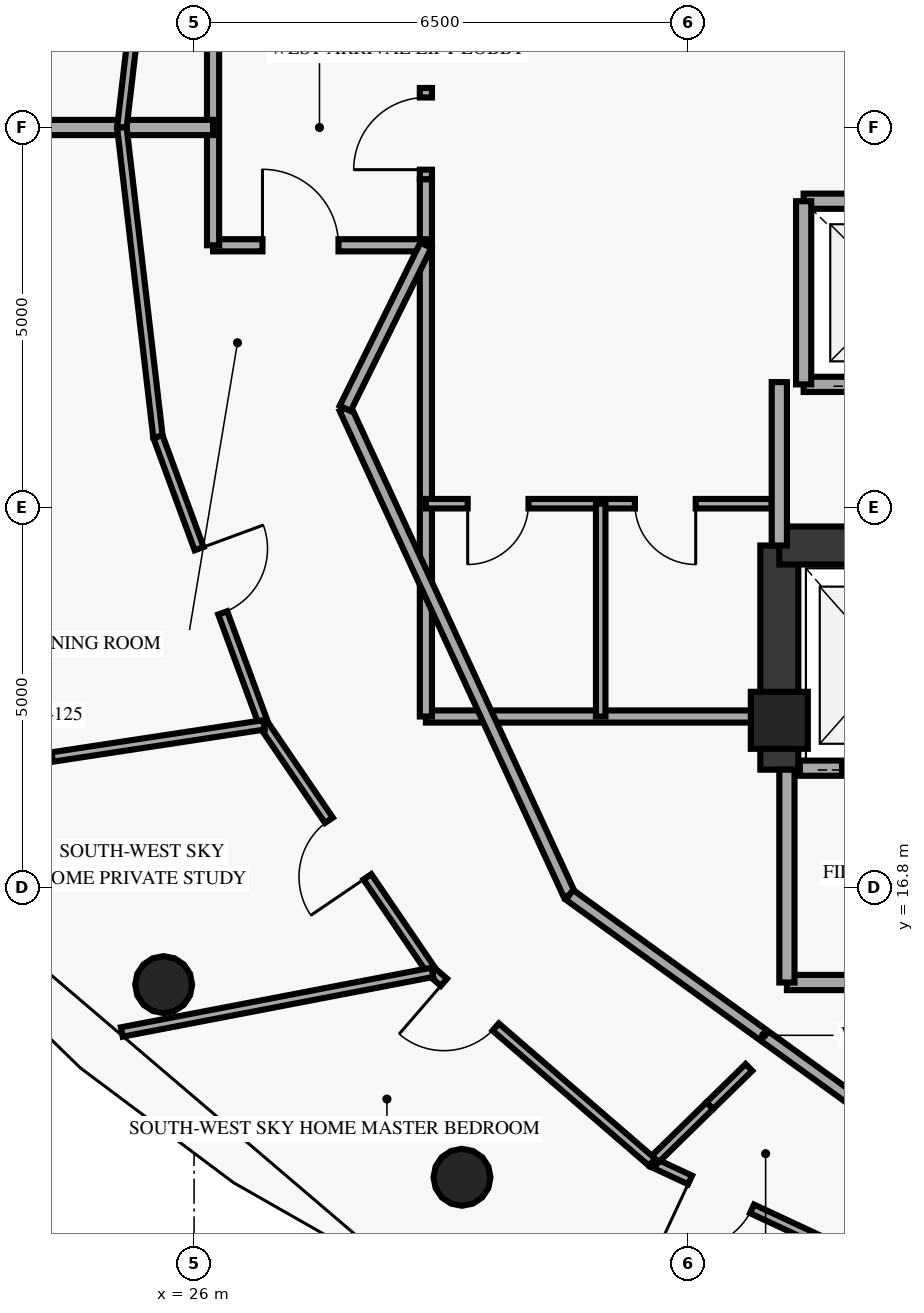
"""IFC4 building model, lengths in metres.
Left out: names, types, materials, properties, quantities, classifications, styles, units other than length and angle.
Written with IfcOpenShell. Run it as: python <this file> out.ifc"""

import sys

from ifc_helpers import new_model, si_unit, direction, frame, frame_2d, origin, origin_2d, place, context, subcontext, project, spatial, rectangle, circle, extrude, element, fill, save


model = new_model("IFC4")
c1 = context("Model", 3, precision=1e-05, world=origin(), true_north=direction((0.0, 1.0)))
c2 = subcontext(c1, "Body", "Model", "MODEL_VIEW")
j1 = project(units=[si_unit("LENGTHUNIT", "METRE"), si_unit("PLANEANGLEUNIT", "RADIAN")], contexts=[c1])
p1 = place(None, origin())
s1 = spatial("IfcSite", under=j1, at=p1, CompositionType="ELEMENT")
p2 = place(p1, origin())
s2 = spatial("IfcBuilding", under=s1, at=p2, CompositionType="ELEMENT")
p3 = place(p2, frame((0.0, 0.0, 297.4)))
s3 = spatial("IfcBuildingStorey", under=s2, at=p3, CompositionType="ELEMENT", Elevation=297.4)
p4 = place(p3, frame((33.7, 19.0, 0.0), z_axis=(0.0, 0.0, 1.0), x_axis=(1.0, 0.0, 0.0)))
e1 = element("IfcColumn", 1, at=p4, inside=s3, PredefinedType="PILASTER", context=c2, shape_type="SweptSolid", body=[
    extrude(rectangle(XDim=0.75, YDim=0.75, at=origin_2d()), origin(), (0.0, 0.0, 1.0), 3.45),
])
for number, where, z_axis, x_axis in (
    (2, (25.6, 15.522, 0.0), (0.0, 0.0, 1.0), (1.0, 0.0, 0.0)),
    (3, (29.525, 12.987, 0.0), (0.0, 0.0, 1.0), (1.0, 0.0, 0.0)),
):
    element("IfcColumn", number, at=place(p3, frame(where, z_axis=z_axis, x_axis=x_axis)), inside=s3, PredefinedType="COLUMN", context=c2, shape_type="SweptSolid", body=[
        extrude(circle(Radius=0.375, at=origin_2d()), origin(), (0.0, 0.0, 1.0), 3.45),
    ])
p5 = place(p3, frame((33.7, 18.35, 0.0), z_axis=(0.0, 0.0, 1.0), x_axis=(0.0, 1.0, 0.0)))
e4 = element("IfcWall", 4, at=p5, inside=s3, PredefinedType="SHEAR", context=c2, shape_type="SweptSolid", body=[
    extrude(rectangle(XDim=2.95, YDim=0.5, at=frame_2d((1.475, 0.0))), origin(), (0.0, 0.0, 1.0), 3.45),
])
p6 = place(p3, frame((33.7, 21.3, 0.0), z_axis=(0.0, 0.0, 1.0), x_axis=(1.0, 0.0, 0.0)))
e5 = element("IfcWall", 5, at=p6, inside=s3, PredefinedType="SHEAR", context=c2, shape_type="SweptSolid", body=[
    extrude(rectangle(XDim=7.55, YDim=0.5, at=frame_2d((3.775, 0.0))), origin(), (0.0, 0.0, 1.0), 3.45),
])
p7 = place(p3, frame((34.02, 23.42, 0.0), z_axis=(0.0, 0.0, 1.0), x_axis=(1.0, 0.0, 0.0)))
e6 = element("IfcWall", 6, at=p7, inside=s3, PredefinedType="SOLIDWALL", context=c2, shape_type="SweptSolid", body=[
    extrude(rectangle(XDim=2.5, YDim=0.2, at=frame_2d((1.25, 0.0))), origin(), (0.0, 0.0, 1.0), 3.45),
])
p8 = place(p7, frame((0.7, 0.0, 0.0)))
e7 = element("IfcOpeningElement", 7, at=p8, cuts=e6, PredefinedType="OPENING", context=c2, shape_type="SweptSolid", body=[
    extrude(rectangle(XDim=1.1, YDim=2.15, at=frame_2d((0.55, 1.075))), frame((0.0, 0.11, 0.0), z_axis=(0.0, -1.0, 0.0), x_axis=(1.0, 0.0, 0.0)), (0.0, 0.0, 1.0), 0.22),
])
p9 = place(p3, frame((34.02, 25.83, 0.0), z_axis=(0.0, 0.0, 1.0), x_axis=(1.0, 0.0, 0.0)))
e8 = element("IfcWall", 8, at=p9, inside=s3, PredefinedType="SOLIDWALL", context=c2, shape_type="SweptSolid", body=[
    extrude(rectangle(XDim=2.5, YDim=0.2, at=frame_2d((1.25, 0.0))), origin(), (0.0, 0.0, 1.0), 3.45),
])
p10 = place(p3, frame((34.02, 23.42, 0.0), z_axis=(0.0, 0.0, 1.0), x_axis=(0.0, 1.0, 0.0)))
e9 = element("IfcWall", 9, at=p10, inside=s3, PredefinedType="SOLIDWALL", context=c2, shape_type="SweptSolid", body=[
    extrude(rectangle(XDim=2.41, YDim=0.2, at=frame_2d((1.205, 0.0))), origin(), (0.0, 0.0, 1.0), 3.45),
])
p11 = place(p3, frame((33.97, 18.37, 0.0), z_axis=(0.0, 0.0, 1.0), x_axis=(1.0, 0.0, 0.0)))
e10 = element("IfcWall", 10, at=p11, inside=s3, PredefinedType="SOLIDWALL", context=c2, shape_type="SweptSolid", body=[
    extrude(rectangle(XDim=2.36, YDim=0.2, at=frame_2d((1.18, 0.0))), origin(), (0.0, 0.0, 1.0), 3.45),
])
p12 = place(p11, frame((0.555, 0.0, 0.0)))
e11 = element("IfcOpeningElement", 11, at=p12, cuts=e10, PredefinedType="OPENING", context=c2, shape_type="SweptSolid", body=[
    extrude(rectangle(XDim=1.25, YDim=2.2, at=frame_2d((0.625, 1.1))), frame((0.0, 0.11, 0.0), z_axis=(0.0, -1.0, 0.0), x_axis=(1.0, 0.0, 0.0)), (0.0, 0.0, 1.0), 0.22),
])
p13 = place(p3, frame((29.05, 19.05, 0.0), z_axis=(0.0, 0.0, 1.0), x_axis=(1.0, 0.0, 0.0)))
e12 = element("IfcWall", 12, at=p13, inside=s3, PredefinedType="PARTITIONING", context=c2, shape_type="SweptSolid", body=[
    extrude(rectangle(XDim=4.65, YDim=0.16, at=frame_2d((2.325, 0.0))), origin(), (0.0, 0.0, 1.0), 3.45),
])
p14 = place(p3, frame((29.05, 19.05, 0.0), z_axis=(0.0, 0.0, 1.0), x_axis=(0.0, 1.0, 0.0)))
e13 = element("IfcWall", 13, at=p14, inside=s3, PredefinedType="PARTITIONING", context=c2, shape_type="SweptSolid", body=[
    extrude(rectangle(XDim=7.07, YDim=0.16, at=frame_2d((3.535, 0.0))), origin(), (0.0, 0.0, 1.0), 3.45),
])
p15 = place(p3, frame((33.6, 21.85, 0.0), z_axis=(0.0, 0.0, 1.0), x_axis=(-1.0, 0.0, 0.0)))
e14 = element("IfcWall", 14, at=p15, inside=s3, PredefinedType="PARTITIONING", context=c2, shape_type="SweptSolid", body=[
    extrude(rectangle(XDim=4.55, YDim=0.125, at=frame_2d((2.275, 0.0))), origin(), (0.0, 0.0, 1.0), 3.45),
])
p16 = place(p15, frame((3.2, 0.0, 0.0)))
e15 = element("IfcOpeningElement", 15, at=p16, cuts=e14, PredefinedType="OPENING", context=c2, shape_type="SweptSolid", body=[
    extrude(rectangle(XDim=0.8, YDim=2.05, at=frame_2d((0.4, 1.025))), frame((0.0, 0.073, 0.0), z_axis=(0.0, -1.0, 0.0), x_axis=(1.0, 0.0, 0.0)), (0.0, 0.0, 1.0), 0.145),
])
p17 = place(p15, frame((1.0, 0.0, 0.0)))
e16 = element("IfcOpeningElement", 16, at=p17, cuts=e14, PredefinedType="OPENING", context=c2, shape_type="SweptSolid", body=[
    extrude(rectangle(XDim=0.8, YDim=2.05, at=frame_2d((0.4, 1.025))), frame((0.0, 0.073, 0.0), z_axis=(0.0, -1.0, 0.0), x_axis=(1.0, 0.0, 0.0)), (0.0, 0.0, 1.0), 0.145),
])
p18 = place(p3, frame((31.35, 19.05, 0.0), z_axis=(0.0, 0.0, 1.0), x_axis=(0.0, 1.0, 0.0)))
e17 = element("IfcWall", 17, at=p18, inside=s3, PredefinedType="PARTITIONING", context=c2, shape_type="SweptSolid", body=[
    extrude(rectangle(XDim=2.8, YDim=0.125, at=frame_2d((1.4, 0.0))), origin(), (0.0, 0.0, 1.0), 3.45),
])
p19 = place(p3, frame((33.7, 21.3, 0.0), z_axis=(0.0, 0.0, 1.0), x_axis=(0.0, 1.0, 0.0)))
e18 = element("IfcWall", 18, at=p19, inside=s3, PredefinedType="SOLIDWALL", context=c2, shape_type="SweptSolid", body=[
    extrude(rectangle(XDim=2.15, YDim=0.2, at=frame_2d((1.075, 0.0))), origin(), (0.0, 0.0, 1.0), 2.835),
])
p20 = place(p3, frame((33.8, 15.55, 0.0), z_axis=(0.0, 0.0, 1.0), x_axis=(1.0, 0.0, 0.0)))
e19 = element("IfcWall", 19, at=p20, inside=s3, PredefinedType="SOLIDWALL", context=c2, shape_type="SweptSolid", body=[
    extrude(rectangle(XDim=7.55, YDim=0.2, at=frame_2d((3.775, 0.0))), origin(), (0.0, 0.0, 1.0), 3.45),
])
p21 = place(p3, frame((33.8, 15.55, 0.0), z_axis=(0.0, 0.0, 1.0), x_axis=(0.0, 1.0, 0.0)))
e20 = element("IfcWall", 20, at=p21, inside=s3, PredefinedType="SOLIDWALL", context=c2, shape_type="SweptSolid", body=[
    extrude(rectangle(XDim=2.8, YDim=0.2, at=frame_2d((1.4, 0.0))), origin(), (0.0, 0.0, 1.0), 3.45),
])
p22 = place(p3, frame((29.05, 26.12, 0.0), z_axis=(0.0, 0.0, 1.0), x_axis=(0.0, 1.0, 0.0)))
e21 = element("IfcWall", 21, at=p22, inside=s3, PredefinedType="PARTITIONING", context=c2, shape_type="SweptSolid", body=[
    extrude(rectangle(XDim=1.2, YDim=0.16, at=frame_2d((0.6, 0.0))), origin(), (0.0, 0.0, 1.0), 3.45),
])
p23 = place(p22, frame((0.125, 0.0, 0.0)))
e22 = element("IfcOpeningElement", 22, at=p23, cuts=e21, PredefinedType="OPENING", context=c2, shape_type="SweptSolid", body=[
    extrude(rectangle(XDim=0.95, YDim=2.15, at=frame_2d((0.475, 1.075))), frame((0.0, 0.09, 0.0), z_axis=(0.0, -1.0, 0.0), x_axis=(1.0, 0.0, 0.0)), (0.0, 0.0, 1.0), 0.18),
])
p24 = place(p3, frame((27.988, 23.104, 0.0), z_axis=(0.0, 0.0, 1.0), x_axis=(0.418656179426, -0.908144814128, 0.0)))
e23 = element("IfcWall", 23, at=p24, inside=s3, PredefinedType="PARTITIONING", context=c2, shape_type="SweptSolid", body=[
    extrude(rectangle(XDim=7.049, YDim=0.16, at=frame_2d((3.524, 0.0))), origin(), (0.0, 0.0, 1.0), 3.45),
])
p25 = place(p3, frame((30.939, 16.703, 0.0), z_axis=(0.0, 0.0, 1.0), x_axis=(0.810290119061, -0.586028943784, 0.0)))
e24 = element("IfcWall", 24, at=p25, inside=s3, PredefinedType="PARTITIONING", context=c2, shape_type="SweptSolid", body=[
    extrude(rectangle(XDim=6.306, YDim=0.16, at=frame_2d((3.153, 0.0))), origin(), (0.0, 0.0, 1.0), 3.45),
])
p26 = place(p3, frame((26.25, 25.25, 0.0), z_axis=(0.0, 0.0, 1.0), x_axis=(1.0, 0.0, 0.0)))
e25 = element("IfcWall", 25, at=p26, inside=s3, PredefinedType="PARTITIONING", context=c2, shape_type="SweptSolid", body=[
    extrude(rectangle(XDim=2.8, YDim=0.16, at=frame_2d((1.4, 0.0))), origin(), (0.0, 0.0, 1.0), 3.45),
])
p27 = place(p26, frame((0.65, 0.0, 0.0)))
e26 = element("IfcOpeningElement", 26, at=p27, cuts=e25, PredefinedType="OPENING", context=c2, shape_type="SweptSolid", body=[
    extrude(rectangle(XDim=1.0, YDim=2.15, at=frame_2d((0.5, 1.075))), frame((0.0, 0.09, 0.0), z_axis=(0.0, -1.0, 0.0), x_axis=(1.0, 0.0, 0.0)), (0.0, 0.0, 1.0), 0.18),
])
p28 = place(p3, frame((26.25, 25.25, 0.0), z_axis=(0.0, 0.0, 1.0), x_axis=(0.0, 1.0, 0.0)))
e27 = element("IfcWall", 27, at=p28, inside=s3, PredefinedType="PARTITIONING", context=c2, shape_type="SweptSolid", body=[
    extrude(rectangle(XDim=3.1, YDim=0.16, at=frame_2d((1.55, 0.0))), origin(), (0.0, 0.0, 1.0), 3.45),
])
p29 = place(p3, frame((27.988, 23.104, 0.0), z_axis=(0.0, 0.0, 1.0), x_axis=(0.443539160525, 0.896254993337, 0.0)))
e28 = element("IfcWall", 28, at=p29, inside=s3, PredefinedType="PARTITIONING", context=c2, shape_type="SweptSolid", body=[
    extrude(rectangle(XDim=2.394, YDim=0.16, at=frame_2d((1.197, 0.0))), origin(), (0.0, 0.0, 1.0), 3.45),
])
p30 = place(p3, frame((26.25, 26.8, 0.0), z_axis=(0.0, 0.0, 1.0), x_axis=(-1.0, 0.0, 0.0)))
e29 = element("IfcWall", 29, at=p30, inside=s3, PredefinedType="PARTITIONING", context=c2, shape_type="SweptSolid", body=[
    extrude(rectangle(XDim=1.2, YDim=0.2, at=frame_2d((0.6, 0.0))), origin(), (0.0, 0.0, 1.0), 3.45),
])
p31 = place(p3, frame((25.05, 26.8, 0.0), z_axis=(0.0, 0.0, 1.0), x_axis=(-1.0, 0.0, 0.0)))
e30 = element("IfcWall", 30, at=p31, inside=s3, PredefinedType="PARTITIONING", context=c2, shape_type="SweptSolid", body=[
    extrude(rectangle(XDim=3.102, YDim=0.2, at=frame_2d((1.551, 0.0))), origin(), (0.0, 0.0, 1.0), 3.45),
])
p32 = place(p3, frame((25.525, 30.869, 0.0), z_axis=(0.0, 0.0, 1.0), x_axis=(-0.115917937966, -0.993258793899, 0.0)))
e31 = element("IfcWall", 31, at=p32, inside=s3, PredefinedType="PARTITIONING", context=c2, shape_type="SweptSolid", body=[
    extrude(rectangle(XDim=4.096, YDim=0.125, at=frame_2d((2.048, 0.0))), origin(), (0.0, 0.0, 1.0), 3.45),
])
p33 = place(p3, frame((35.389, 11.616, 0.0), z_axis=(0.0, 0.0, 1.0), x_axis=(-0.906162977721, 0.422928667517, 0.0)))
e32 = element("IfcWall", 32, at=p33, inside=s3, PredefinedType="PARTITIONING", context=c2, shape_type="SweptSolid", body=[
    extrude(rectangle(XDim=3.712, YDim=0.125, at=frame_2d((1.856, 0.0))), origin(), (0.0, 0.0, 1.0), 3.45),
])
p34 = place(p33, frame((2.26, 0.0, 0.0)))
e33 = element("IfcOpeningElement", 33, at=p34, cuts=e32, PredefinedType="OPENING", context=c2, shape_type="SweptSolid", body=[
    extrude(rectangle(XDim=0.9, YDim=2.1, at=frame_2d((0.45, 1.05))), frame((0.0, 0.073, 0.0), z_axis=(0.0, -1.0, 0.0), x_axis=(1.0, 0.0, 0.0)), (0.0, 0.0, 1.0), 0.145),
])
p35 = place(p3, frame((33.3, 14.433, 0.0), z_axis=(0.0, 0.0, 1.0), x_axis=(-0.714672361604, -0.699459373774, 0.0)))
e34 = element("IfcWall", 34, at=p35, inside=s3, PredefinedType="PARTITIONING", context=c2, shape_type="SweptSolid", body=[
    extrude(rectangle(XDim=0.722, YDim=0.125, at=frame_2d((0.361, 0.0))), origin(), (0.0, 0.0, 1.0), 3.095),
])
p36 = place(p3, frame((32.784, 13.928, 0.0), z_axis=(0.0, 0.0, 1.0), x_axis=(-0.715111418379, -0.699010485833, 0.0)))
e35 = element("IfcWall", 35, at=p36, inside=s3, PredefinedType="PARTITIONING", context=c2, shape_type="SweptSolid", body=[
    extrude(rectangle(XDim=1.062, YDim=0.125, at=frame_2d((0.531, 0.0))), origin(), (0.0, 0.0, 1.0), 3.45),
])
p37 = place(p3, frame((25.05, 26.8, 0.0), z_axis=(0.0, 0.0, 1.0), x_axis=(0.115911076473, -0.993259594643, 0.0)))
e36 = element("IfcWall", 36, at=p37, inside=s3, PredefinedType="PARTITIONING", context=c2, shape_type="SweptSolid", body=[
    extrude(rectangle(XDim=4.097, YDim=0.125, at=frame_2d((2.048, 0.0))), origin(), (0.0, 0.0, 1.0), 3.45),
])
p38 = place(p3, frame((26.919, 18.94, 0.0), z_axis=(0.0, 0.0, 1.0), x_axis=(-0.345128286029, 0.938555521097, 0.0)))
e37 = element("IfcWall", 37, at=p38, inside=s3, PredefinedType="PARTITIONING", context=c2, shape_type="SweptSolid", body=[
    extrude(rectangle(XDim=4.039, YDim=0.125, at=frame_2d((2.02, 0.0))), origin(), (0.0, 0.0, 1.0), 3.45),
])
p39 = place(p38, frame((1.57, 0.0, 0.0)))
e38 = element("IfcOpeningElement", 38, at=p39, cuts=e37, PredefinedType="OPENING", context=c2, shape_type="SweptSolid", body=[
    extrude(rectangle(XDim=0.9, YDim=2.1, at=frame_2d((0.45, 1.05))), frame((0.0, 0.073, 0.0), z_axis=(0.0, -1.0, 0.0), x_axis=(1.0, 0.0, 0.0)), (0.0, 0.0, 1.0), 0.145),
])
p40 = place(p3, frame((29.136, 15.684, 0.0), z_axis=(0.0, 0.0, 1.0), x_axis=(-0.562840533245, 0.826565505049, 0.0)))
e39 = element("IfcWall", 39, at=p40, inside=s3, PredefinedType="PARTITIONING", context=c2, shape_type="SweptSolid", body=[
    extrude(rectangle(XDim=3.939, YDim=0.125, at=frame_2d((1.969, 0.0))), origin(), (0.0, 0.0, 1.0), 3.45),
])
p41 = place(p40, frame((1.52, 0.0, 0.0)))
e40 = element("IfcOpeningElement", 40, at=p41, cuts=e39, PredefinedType="OPENING", context=c2, shape_type="SweptSolid", body=[
    extrude(rectangle(XDim=0.9, YDim=2.1, at=frame_2d((0.45, 1.05))), frame((0.0, 0.073, 0.0), z_axis=(0.0, -1.0, 0.0), x_axis=(1.0, 0.0, 0.0)), (0.0, 0.0, 1.0), 0.145),
])
p42 = place(p3, frame((32.025, 13.186, 0.0), z_axis=(0.0, 0.0, 1.0), x_axis=(-0.756424716633, 0.654080765706, 0.0)))
e41 = element("IfcWall", 41, at=p42, inside=s3, PredefinedType="PARTITIONING", context=c2, shape_type="SweptSolid", body=[
    extrude(rectangle(XDim=3.819, YDim=0.125, at=frame_2d((1.91, 0.0))), origin(), (0.0, 0.0, 1.0), 3.45),
])
p43 = place(p42, frame((2.719, 0.0, 0.0)))
e42 = element("IfcOpeningElement", 42, at=p43, cuts=e41, PredefinedType="OPENING", context=c2, shape_type="SweptSolid", body=[
    extrude(rectangle(XDim=0.9, YDim=2.1, at=frame_2d((0.45, 1.05))), frame((0.0, 0.073, 0.0), z_axis=(0.0, -1.0, 0.0), x_axis=(1.0, 0.0, 0.0)), (0.0, 0.0, 1.0), 0.145),
])
p44 = place(p3, frame((26.919, 18.94, 0.0), z_axis=(0.0, 0.0, 1.0), x_axis=(-0.988653601615, -0.150213368291, 0.0)))
e43 = element("IfcWall", 43, at=p44, inside=s3, PredefinedType="PARTITIONING", context=c2, shape_type="SweptSolid", body=[
    extrude(rectangle(XDim=5.672, YDim=0.125, at=frame_2d((2.836, 0.0))), origin(), (0.0, 0.0, 1.0), 3.45),
])
p45 = place(p3, frame((29.136, 15.684, 0.0), z_axis=(0.0, 0.0, 1.0), x_axis=(-0.982041578383, -0.188664618643, 0.0)))
e44 = element("IfcWall", 44, at=p45, inside=s3, PredefinedType="PARTITIONING", context=c2, shape_type="SweptSolid", body=[
    extrude(rectangle(XDim=4.162, YDim=0.125, at=frame_2d((2.081, 0.0))), origin(), (0.0, 0.0, 1.0), 3.45),
])
p46 = place(p12, origin())
e45 = element("IfcDoor", 45, at=p46, inside=s3, OperationType="DOUBLE_DOOR_SLIDING", PredefinedType="DOOR", context=c2, shape_type="SweptSolid", body=[
    extrude(rectangle(XDim=1.25, YDim=2.2, at=frame_2d((0.625, 1.1))), frame((0.0, 0.025, 0.0), z_axis=(0.0, -1.0, 0.0), x_axis=(1.0, 0.0, 0.0)), (0.0, 0.0, 1.0), 0.05),
])
fill(e11, e45)
p47 = place(p16, origin())
e46 = element("IfcDoor", 46, at=p47, inside=s3, OperationType="SINGLE_SWING_RIGHT", PredefinedType="DOOR", context=c2, shape_type="SweptSolid", body=[
    extrude(rectangle(XDim=0.8, YDim=2.05, at=frame_2d((0.4, 1.025))), frame((0.0, 0.025, 0.0), z_axis=(0.0, -1.0, 0.0), x_axis=(1.0, 0.0, 0.0)), (0.0, 0.0, 1.0), 0.05),
])
fill(e15, e46)
p48 = place(p17, origin())
e47 = element("IfcDoor", 47, at=p48, inside=s3, OperationType="SINGLE_SWING_LEFT", PredefinedType="DOOR", context=c2, shape_type="SweptSolid", body=[
    extrude(rectangle(XDim=0.8, YDim=2.05, at=frame_2d((0.4, 1.025))), frame((0.0, 0.025, 0.0), z_axis=(0.0, -1.0, 0.0), x_axis=(1.0, 0.0, 0.0)), (0.0, 0.0, 1.0), 0.05),
])
fill(e16, e47)
p49 = place(p23, origin())
e48 = element("IfcDoor", 48, at=p49, inside=s3, OperationType="SINGLE_SWING_RIGHT", PredefinedType="DOOR", context=c2, shape_type="SweptSolid", body=[
    extrude(rectangle(XDim=0.95, YDim=2.15, at=frame_2d((0.475, 1.075))), frame((0.0, 0.025, 0.0), z_axis=(0.0, -1.0, 0.0), x_axis=(1.0, 0.0, 0.0)), (0.0, 0.0, 1.0), 0.05),
])
fill(e22, e48)
p50 = place(p27, origin())
e49 = element("IfcDoor", 49, at=p50, inside=s3, OperationType="SINGLE_SWING_LEFT", PredefinedType="DOOR", context=c2, shape_type="SweptSolid", body=[
    extrude(rectangle(XDim=1.0, YDim=2.15, at=frame_2d((0.5, 1.075))), frame((0.0, 0.025, 0.0), z_axis=(0.0, -1.0, 0.0), x_axis=(1.0, 0.0, 0.0)), (0.0, 0.0, 1.0), 0.05),
])
fill(e26, e49)
p51 = place(p34, origin())
e50 = element("IfcDoor", 50, at=p51, inside=s3, OperationType="SINGLE_SWING_RIGHT", PredefinedType="DOOR", context=c2, shape_type="SweptSolid", body=[
    extrude(rectangle(XDim=0.9, YDim=2.1, at=frame_2d((0.45, 1.05))), frame((0.0, 0.025, 0.0), z_axis=(0.0, -1.0, 0.0), x_axis=(1.0, 0.0, 0.0)), (0.0, 0.0, 1.0), 0.05),
])
fill(e33, e50)
p52 = place(p39, origin())
e51 = element("IfcDoor", 51, at=p52, inside=s3, OperationType="SINGLE_SWING_RIGHT", PredefinedType="DOOR", context=c2, shape_type="SweptSolid", body=[
    extrude(rectangle(XDim=0.9, YDim=2.1, at=frame_2d((0.45, 1.05))), frame((0.0, 0.025, 0.0), z_axis=(0.0, -1.0, 0.0), x_axis=(1.0, 0.0, 0.0)), (0.0, 0.0, 1.0), 0.05),
])
fill(e38, e51)
p53 = place(p41, origin())
e52 = element("IfcDoor", 52, at=p53, inside=s3, OperationType="SINGLE_SWING_LEFT", PredefinedType="DOOR", context=c2, shape_type="SweptSolid", body=[
    extrude(rectangle(XDim=0.9, YDim=2.1, at=frame_2d((0.45, 1.05))), frame((0.0, 0.025, 0.0), z_axis=(0.0, -1.0, 0.0), x_axis=(1.0, 0.0, 0.0)), (0.0, 0.0, 1.0), 0.05),
])
fill(e40, e52)
p54 = place(p43, origin())
e53 = element("IfcDoor", 53, at=p54, inside=s3, OperationType="SINGLE_SWING_RIGHT", PredefinedType="DOOR", context=c2, shape_type="SweptSolid", body=[
    extrude(rectangle(XDim=0.9, YDim=2.1, at=frame_2d((0.45, 1.05))), frame((0.0, 0.025, 0.0), z_axis=(0.0, -1.0, 0.0), x_axis=(1.0, 0.0, 0.0)), (0.0, 0.0, 1.0), 0.05),
])
fill(e42, e53)
save(model, sys.argv[1])
